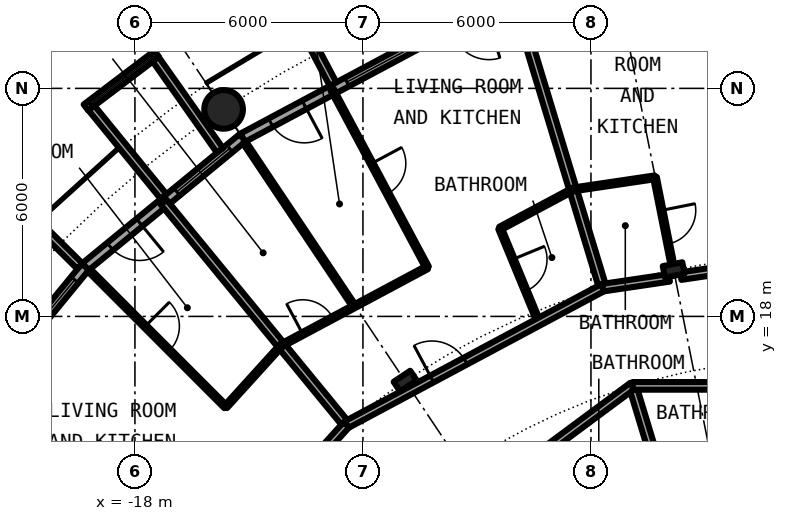
"""IFC4 building model, lengths in metres.
Left out: names, types, materials, properties, quantities, classifications, styles, units other than length and angle.
Written with IfcOpenShell. Run it as: python <this file> out.ifc"""

import sys

from ifc_helpers import new_model, si_unit, direction, frame, frame_2d, origin, origin_2d, place, context, subcontext, project, spatial, rectangle, circle, hollow_circle, i_section, extrude, element, fill, save


model = new_model("IFC4")
c1 = context("Model", 3, precision=1e-05, world=origin(), true_north=direction((0.0, 1.0)))
c2 = subcontext(c1, "Body", "Model", "MODEL_VIEW")
j1 = project(units=[si_unit("LENGTHUNIT", "METRE"), si_unit("PLANEANGLEUNIT", "RADIAN")], contexts=[c1])
p1 = place(None, origin())
s1 = spatial("IfcSite", under=j1, at=p1, CompositionType="ELEMENT")
p2 = place(p1, origin())
s2 = spatial("IfcBuilding", under=s1, at=p2, CompositionType="ELEMENT")
p3 = place(p2, frame((0.0, 0.0, 75.8)))
s3 = spatial("IfcBuildingStorey", under=s2, at=p3, CompositionType="ELEMENT", Elevation=75.8)
p4 = place(p3, frame((-15.667, 23.448, 0.0), z_axis=(0.0, 0.0, 1.0), x_axis=(1.0, 0.0, 0.0)))
e1 = element("IfcColumn", 1, at=p4, inside=s3, PredefinedType="COLUMN", context=c2, shape_type="SweptSolid", body=[
    extrude(hollow_circle(Radius=0.508, WallThickness=0.04, at=origin_2d()), origin(), (0.0, 0.0, 1.0), 3.05),
])
for number, where, z_axis, x_axis in (
    (2, (-3.824, 19.223, 0.0), (0.0, 0.0, 1.0), (-0.195, 0.981, 0.0)),
    (3, (-10.889, 16.297, 0.0), (0.0, 0.0, 1.0), (-0.556, 0.831, 0.0)),
):
    element("IfcColumn", number, at=place(p3, frame(where, z_axis=z_axis, x_axis=x_axis)), inside=s3, PredefinedType="COLUMN", context=c2, shape_type="SweptSolid", body=[
        extrude(i_section(OverallWidth=0.306, OverallDepth=0.524, WebThickness=0.021, FlangeThickness=0.04, FilletRadius=0.027, at=origin_2d()), origin(), (0.0, 0.0, 1.0), 3.05),
    ])
p5 = place(p3, frame((-10.447, 25.222, 0.0), z_axis=(0.0, 0.0, 1.0), x_axis=(-0.881915646801, -0.471407246368, 0.0)))
e4 = element("IfcWall", 4, at=p5, inside=s3, PredefinedType="SOLIDWALL", context=c2, shape_type="SweptSolid", body=[
    extrude(rectangle(XDim=5.352, YDim=0.25, at=frame_2d((2.676, 0.0))), origin(), (0.0, 0.0, 1.0), 2.7),
])
p6 = place(p5, frame((0.441, 0.0, 0.3)))
e5 = element("IfcOpeningElement", 5, at=p6, cuts=e4, PredefinedType="OPENING", context=c2, shape_type="SweptSolid", body=[
    extrude(rectangle(XDim=1.8, YDim=2.1, at=frame_2d((0.9, 1.05))), frame((0.0, 0.135, 0.0), z_axis=(0.0, -1.0, 0.0), x_axis=(1.0, 0.0, 0.0)), (0.0, 0.0, 1.0), 0.27),
])
p7 = place(p5, frame((3.51, 0.0, 0.0)))
e6 = element("IfcOpeningElement", 6, at=p7, cuts=e4, PredefinedType="OPENING", context=c2, shape_type="SweptSolid", body=[
    extrude(rectangle(XDim=1.0, YDim=2.2, at=frame_2d((0.5, 1.1))), frame((0.0, 0.135, 0.0), z_axis=(0.0, -1.0, 0.0), x_axis=(1.0, 0.0, 0.0)), (0.0, 0.0, 1.0), 0.27),
])
p8 = place(p3, frame((-12.787, 24.113, -0.03), z_axis=(0.0, 0.0, 1.0), x_axis=(-0.468365282436, 0.883534924159, 0.0)))
e7 = element("IfcWall", 7, at=p8, inside=s3, PredefinedType="SOLIDWALL", context=c2, shape_type="SweptSolid", body=[
    extrude(rectangle(XDim=3.006, YDim=0.2, at=frame_2d((1.503, 0.0))), origin(), (0.0, 0.0, 1.0), 2.73),
])
p9 = place(p3, frame((-15.167, 22.699, 0.0), z_axis=(0.0, 0.0, 1.0), x_axis=(-0.773019449054, -0.634382322723, 0.0)))
e8 = element("IfcWall", 8, at=p9, inside=s3, PredefinedType="SOLIDWALL", context=c2, shape_type="SweptSolid", body=[
    extrude(rectangle(XDim=5.352, YDim=0.25, at=frame_2d((2.676, 0.0))), origin(), (0.0, 0.0, 1.0), 2.7),
])
p10 = place(p9, frame((0.441, 0.0, 0.3)))
e9 = element("IfcOpeningElement", 9, at=p10, cuts=e8, PredefinedType="OPENING", context=c2, shape_type="SweptSolid", body=[
    extrude(rectangle(XDim=1.8, YDim=2.1, at=frame_2d((0.9, 1.05))), frame((0.0, 0.135, 0.0), z_axis=(0.0, -1.0, 0.0), x_axis=(1.0, 0.0, 0.0)), (0.0, 0.0, 1.0), 0.27),
])
p11 = place(p9, frame((3.51, 0.0, 0.0)))
e10 = element("IfcOpeningElement", 10, at=p11, cuts=e8, PredefinedType="OPENING", context=c2, shape_type="SweptSolid", body=[
    extrude(rectangle(XDim=1.0, YDim=2.2, at=frame_2d((0.5, 1.1))), frame((0.0, 0.135, 0.0), z_axis=(0.0, -1.0, 0.0), x_axis=(1.0, 0.0, 0.0)), (0.0, 0.0, 1.0), 0.27),
])
p12 = place(p3, frame((-17.427, 24.909, -0.03), z_axis=(0.0, 0.0, 1.0), x_axis=(-0.796842165306, -0.60418752353, 0.0)))
e11 = element("IfcWall", 11, at=p12, inside=s3, PredefinedType="SOLIDWALL", context=c2, shape_type="SweptSolid", body=[
    extrude(rectangle(XDim=2.337, YDim=0.2, at=frame_2d((1.168, 0.0))), origin(), (0.0, 0.0, 1.0), 2.73),
])
p13 = place(p12, frame((0.128, 0.0, 0.33)))
e12 = element("IfcOpeningElement", 12, at=p13, cuts=e11, PredefinedType="OPENING", context=c2, shape_type="SweptSolid", body=[
    extrude(circle(Radius=1.04, at=frame_2d((1.04, 1.04))), frame((0.0, 0.11, 0.0), z_axis=(0.0, -1.0, 0.0), x_axis=(1.0, 0.0, 0.0)), (0.0, 0.0, 1.0), 0.22),
])
p14 = place(p3, frame((-15.765, 22.37, -0.03), z_axis=(0.0, 0.0, 1.0), x_axis=(-0.576274612209, 0.817256123454, 0.0)))
e13 = element("IfcWall", 13, at=p14, inside=s3, PredefinedType="SOLIDWALL", context=c2, shape_type="SweptSolid", body=[
    extrude(rectangle(XDim=2.933, YDim=0.2, at=frame_2d((1.466, 0.0))), origin(), (0.0, 0.0, 1.0), 2.73),
])
p15 = place(p3, frame((-17.246, 21.155, -0.03), z_axis=(0.0, 0.0, 1.0), x_axis=(-0.631741648902, 0.775179004516, 0.0)))
e14 = element("IfcWall", 14, at=p15, inside=s3, PredefinedType="SOLIDWALL", context=c2, shape_type="SweptSolid", body=[
    extrude(rectangle(XDim=3.006, YDim=0.2, at=frame_2d((1.503, 0.0))), origin(), (0.0, 0.0, 1.0), 2.73),
])
p16 = place(p3, frame((-19.304, 19.304, 0.0), z_axis=(0.0, 0.0, 1.0), x_axis=(-0.634382322723, -0.773019449054, 0.0)))
e15 = element("IfcWall", 15, at=p16, inside=s3, PredefinedType="SOLIDWALL", context=c2, shape_type="SweptSolid", body=[
    extrude(rectangle(XDim=5.352, YDim=0.25, at=frame_2d((2.676, 0.0))), origin(), (0.0, 0.0, 1.0), 2.7),
])
p17 = place(p16, frame((0.441, 0.0, 0.3)))
e16 = element("IfcOpeningElement", 16, at=p17, cuts=e15, PredefinedType="OPENING", context=c2, shape_type="SweptSolid", body=[
    extrude(rectangle(XDim=1.8, YDim=2.1, at=frame_2d((0.9, 1.05))), frame((0.0, 0.135, 0.0), z_axis=(0.0, -1.0, 0.0), x_axis=(1.0, 0.0, 0.0)), (0.0, 0.0, 1.0), 0.27),
])
p18 = place(p16, frame((3.51, 0.0, 0.0)))
e17 = element("IfcOpeningElement", 17, at=p18, cuts=e15, PredefinedType="OPENING", context=c2, shape_type="SweptSolid", body=[
    extrude(rectangle(XDim=1.0, YDim=2.2, at=frame_2d((0.5, 1.1))), frame((0.0, 0.135, 0.0), z_axis=(0.0, -1.0, 0.0), x_axis=(1.0, 0.0, 0.0)), (0.0, 0.0, 1.0), 0.27),
])
p19 = place(p3, frame((-19.45, 19.323, -0.03), z_axis=(0.0, 0.0, 1.0), x_axis=(-0.709727076896, 0.704476739375, 0.0)))
e18 = element("IfcWall", 18, at=p19, inside=s3, PredefinedType="SOLIDWALL", context=c2, shape_type="SweptSolid", body=[
    extrude(rectangle(XDim=2.883, YDim=0.2, at=frame_2d((1.441, 0.0))), origin(), (0.0, 0.0, 1.0), 2.73),
])
p20 = place(p3, frame((-22.595, 15.098, 0.0), z_axis=(0.0, 0.0, 1.0), x_axis=(0.831382022135, -0.555701298605, 0.0)))
e19 = element("IfcWall", 19, at=p20, inside=s3, PredefinedType="PARTITIONING", context=c2, shape_type="SweptSolid", body=[
    extrude(rectangle(XDim=7.313, YDim=0.2, at=frame_2d((3.657, 0.0))), origin(), (0.0, 0.0, 1.0), 2.7),
])
p21 = place(p3, frame((-7.887, 26.005, 0.0), z_axis=(0.0, 0.0, 1.0), x_axis=(0.29005838641, -0.957008951094, 0.0)))
e20 = element("IfcWall", 20, at=p21, inside=s3, PredefinedType="PARTITIONING", context=c2, shape_type="SweptSolid", body=[
    extrude(rectangle(XDim=7.574, YDim=0.2, at=frame_2d((3.787, 0.0))), origin(), (0.0, 0.0, 1.0), 2.7),
])
p22 = place(p3, frame((-4.907, 16.172, 0.0), z_axis=(0.0, 0.0, 1.0), x_axis=(0.289977130626, -0.957033575019, 0.0)))
e21 = element("IfcWall", 21, at=p22, inside=s3, PredefinedType="PARTITIONING", context=c2, shape_type="SweptSolid", body=[
    extrude(rectangle(XDim=9.18, YDim=0.2, at=frame_2d((4.59, 0.0))), origin(), (0.0, 0.0, 1.0), 2.7),
])
p23 = place(p3, frame((-19.211, 19.221, 0.0), z_axis=(0.0, 0.0, 1.0), x_axis=(0.706914880313, -0.707298629994, 0.0)))
e22 = element("IfcWall", 22, at=p23, inside=s3, PredefinedType="PARTITIONING", context=c2, shape_type="SweptSolid", body=[
    extrude(rectangle(XDim=5.09, YDim=0.1, at=frame_2d((2.545, 0.0))), origin(), (0.0, 0.0, 1.0), 2.7),
])
p24 = place(p23, frame((2.095, 0.0, 0.0)))
e23 = element("IfcOpeningElement", 23, at=p24, cuts=e22, PredefinedType="OPENING", context=c2, shape_type="SweptSolid", body=[
    extrude(rectangle(XDim=0.9, YDim=2.3, at=frame_2d((0.45, 1.15))), frame((0.0, 0.06, 0.0), z_axis=(0.0, -1.0, 0.0), x_axis=(1.0, 0.0, 0.0)), (0.0, 0.0, 1.0), 0.12),
])
p25 = place(p3, frame((-17.243, 21.005, 0.0), z_axis=(0.0, 0.0, 1.0), x_axis=(0.63447412651, -0.772944100689, 0.0)))
e24 = element("IfcWall", 24, at=p25, inside=s3, PredefinedType="PARTITIONING", context=c2, shape_type="SweptSolid", body=[
    extrude(rectangle(XDim=7.576, YDim=0.2, at=frame_2d((3.788, 0.0))), origin(), (0.0, 0.0, 1.0), 2.7),
])
p26 = place(p3, frame((-15.119, 22.581, 0.0), z_axis=(0.0, 0.0, 1.0), x_axis=(0.556271707676, -0.83100047367, 0.0)))
e25 = element("IfcWall", 25, at=p26, inside=s3, PredefinedType="PARTITIONING", context=c2, shape_type="SweptSolid", body=[
    extrude(rectangle(XDim=5.195, YDim=0.1, at=frame_2d((2.598, 0.0))), origin(), (0.0, 0.0, 1.0), 2.7),
])
p27 = place(p3, frame((-12.81, 23.966, 0.0), z_axis=(0.0, 0.0, 1.0), x_axis=(0.47140999111, -0.881914179658, 0.0)))
e26 = element("IfcWall", 26, at=p27, inside=s3, PredefinedType="PARTITIONING", context=c2, shape_type="SweptSolid", body=[
    extrude(rectangle(XDim=5.303, YDim=0.1, at=frame_2d((2.652, 0.0))), origin(), (0.0, 0.0, 1.0), 2.7),
])
p28 = place(p27, frame((2.202, 0.0, 0.0)))
e27 = element("IfcOpeningElement", 27, at=p28, cuts=e26, PredefinedType="OPENING", context=c2, shape_type="SweptSolid", body=[
    extrude(rectangle(XDim=0.9, YDim=2.3, at=frame_2d((0.45, 1.15))), frame((0.0, 0.06, 0.0), z_axis=(0.0, -1.0, 0.0), x_axis=(1.0, 0.0, 0.0)), (0.0, 0.0, 1.0), 0.12),
])
p29 = place(p3, frame((-8.392, 20.314, 0.0), z_axis=(0.0, 0.0, 1.0), x_axis=(0.38190329031, -0.924202292169, 0.0)))
e28 = element("IfcWall", 28, at=p29, inside=s3, PredefinedType="PARTITIONING", context=c2, shape_type="SweptSolid", body=[
    extrude(rectangle(XDim=2.661, YDim=0.1, at=frame_2d((1.33, 0.0))), origin(), (0.0, 0.0, 1.0), 2.7),
])
p30 = place(p29, frame((0.88, 0.0, 0.0)))
e29 = element("IfcOpeningElement", 29, at=p30, cuts=e28, PredefinedType="OPENING", context=c2, shape_type="SweptSolid", body=[
    extrude(rectangle(XDim=0.9, YDim=2.3, at=frame_2d((0.45, 1.15))), frame((0.0, 0.06, 0.0), z_axis=(0.0, -1.0, 0.0), x_axis=(1.0, 0.0, 0.0)), (0.0, 0.0, 1.0), 0.12),
])
p31 = place(p3, frame((-4.316, 21.66, 0.0), z_axis=(0.0, 0.0, 1.0), x_axis=(0.195524955938, -0.980698726218, 0.0)))
e30 = element("IfcWall", 30, at=p31, inside=s3, PredefinedType="PARTITIONING", context=c2, shape_type="SweptSolid", body=[
    extrude(rectangle(XDim=2.224, YDim=0.1, at=frame_2d((1.112, 0.0))), origin(), (0.0, 0.0, 1.0), 2.7),
])
p32 = place(p31, frame((0.887, 0.0, 0.0)))
e31 = element("IfcOpeningElement", 31, at=p32, cuts=e30, PredefinedType="OPENING", context=c2, shape_type="SweptSolid", body=[
    extrude(rectangle(XDim=0.9, YDim=2.3, at=frame_2d((0.45, 1.15))), frame((0.0, 0.06, 0.0), z_axis=(0.0, -1.0, 0.0), x_axis=(1.0, 0.0, 0.0)), (0.0, 0.0, 1.0), 0.12),
])
p33 = place(p3, frame((-12.745, 10.358, 0.0), z_axis=(0.0, 0.0, 1.0), x_axis=(0.803191461888, 0.595720971219, 0.0)))
e32 = element("IfcWall", 32, at=p33, inside=s3, PredefinedType="PARTITIONING", context=c2, shape_type="SweptSolid", body=[
    extrude(rectangle(XDim=9.76, YDim=0.2, at=frame_2d((4.88, 0.0))), origin(), (0.0, 0.0, 1.0), 2.7),
])
p34 = place(p33, frame((4.38, 0.0, 0.0)))
e33 = element("IfcOpeningElement", 33, at=p34, cuts=e32, PredefinedType="OPENING", context=c2, shape_type="SweptSolid", body=[
    extrude(rectangle(XDim=1.0, YDim=2.3, at=frame_2d((0.5, 1.15))), frame((0.0, 0.11, 0.0), z_axis=(0.0, -1.0, 0.0), x_axis=(1.0, 0.0, 0.0)), (0.0, 0.0, 1.0), 0.22),
])
p35 = place(p3, frame((-4.906, 16.172, 0.0), z_axis=(0.0, 0.0, 1.0), x_axis=(1.0, 0.0, 0.0)))
e34 = element("IfcWall", 34, at=p35, inside=s3, PredefinedType="PARTITIONING", context=c2, shape_type="SweptSolid", body=[
    extrude(rectangle(XDim=9.812, YDim=0.2, at=frame_2d((4.906, 0.0))), origin(), (0.0, 0.0, 1.0), 2.7),
])
p36 = place(p35, frame((4.406, 0.0, 0.0)))
e35 = element("IfcOpeningElement", 35, at=p36, cuts=e34, PredefinedType="OPENING", context=c2, shape_type="SweptSolid", body=[
    extrude(rectangle(XDim=1.0, YDim=2.3, at=frame_2d((0.5, 1.15))), frame((0.0, 0.11, 0.0), z_axis=(0.0, -1.0, 0.0), x_axis=(1.0, 0.0, 0.0)), (0.0, 0.0, 1.0), 0.22),
])
p37 = place(p3, frame((-12.434, 15.151, 0.0), z_axis=(0.0, 0.0, 1.0), x_axis=(0.881899173092, 0.47143806433, 0.0)))
e36 = element("IfcWall", 36, at=p37, inside=s3, PredefinedType="PARTITIONING", context=c2, shape_type="SweptSolid", body=[
    extrude(rectangle(XDim=7.647, YDim=0.2, at=frame_2d((3.824, 0.0))), origin(), (0.0, 0.0, 1.0), 2.38),
])
p38 = place(p37, frame((2.55, 0.0, 0.0)))
e37 = element("IfcOpeningElement", 37, at=p38, cuts=e36, PredefinedType="OPENING", context=c2, shape_type="SweptSolid", body=[
    extrude(rectangle(XDim=1.0, YDim=2.3, at=frame_2d((0.5, 1.15))), frame((0.0, 0.11, 0.0), z_axis=(0.0, -1.0, 0.0), x_axis=(1.0, 0.0, 0.0)), (0.0, 0.0, 1.0), 0.22),
])
p39 = place(p3, frame((-16.193, 11.004, 0.0), z_axis=(0.0, 0.0, 1.0), x_axis=(0.671601747072, 0.740912338492, 0.0)))
e38 = element("IfcWall", 38, at=p39, inside=s3, PredefinedType="PARTITIONING", context=c2, shape_type="SweptSolid", body=[
    extrude(rectangle(XDim=5.597, YDim=0.2, at=frame_2d((2.799, 0.0))), origin(), (0.0, 0.0, 1.0), 2.38),
])
p40 = place(p39, frame((3.18, 0.0, 0.0)))
e39 = element("IfcOpeningElement", 39, at=p40, cuts=e38, PredefinedType="OPENING", context=c2, shape_type="SweptSolid", body=[
    extrude(rectangle(XDim=1.0, YDim=2.3, at=frame_2d((0.5, 1.15))), frame((0.0, 0.11, 0.0), z_axis=(0.0, -1.0, 0.0), x_axis=(1.0, 0.0, 0.0)), (0.0, 0.0, 1.0), 0.22),
])
p41 = place(p3, frame((-5.69, 18.756, 0.0), z_axis=(0.0, 0.0, 1.0), x_axis=(0.989265547993, 0.146128968906, 0.0)))
e40 = element("IfcWall", 40, at=p41, inside=s3, PredefinedType="PARTITIONING", context=c2, shape_type="SweptSolid", body=[
    extrude(rectangle(XDim=1.771, YDim=0.2, at=frame_2d((0.885, 0.0))), origin(), (0.0, 0.0, 1.0), 2.38),
])
p42 = place(p3, frame((-3.635, 19.06, 0.0), z_axis=(0.0, 0.0, 1.0), x_axis=(0.989179233347, 0.14671211373, 0.0)))
e41 = element("IfcWall", 41, at=p42, inside=s3, PredefinedType="PARTITIONING", context=c2, shape_type="SweptSolid", body=[
    extrude(rectangle(XDim=3.681, YDim=0.2, at=frame_2d((1.84, 0.0))), origin(), (0.0, 0.0, 1.0), 2.38),
])
p43 = place(p42, frame((1.258, 0.0, 0.0)))
e42 = element("IfcOpeningElement", 42, at=p43, cuts=e41, PredefinedType="OPENING", context=c2, shape_type="SweptSolid", body=[
    extrude(rectangle(XDim=1.0, YDim=2.3, at=frame_2d((0.5, 1.15))), frame((0.0, 0.11, 0.0), z_axis=(0.0, -1.0, 0.0), x_axis=(1.0, 0.0, 0.0)), (0.0, 0.0, 1.0), 0.22),
])
p44 = place(p3, frame((-14.148, 17.236, 0.0), z_axis=(0.0, 0.0, 1.0), x_axis=(0.881763472003, 0.471691826769, 0.0)))
e43 = element("IfcWall", 43, at=p44, inside=s3, PredefinedType="PARTITIONING", context=c2, shape_type="SweptSolid", body=[
    extrude(rectangle(XDim=4.35, YDim=0.1, at=frame_2d((2.175, 0.0))), origin(), (0.0, 0.0, 1.0), 2.7),
])
p45 = place(p44, frame((0.639, 0.0, 0.0)))
e44 = element("IfcOpeningElement", 44, at=p45, cuts=e43, PredefinedType="OPENING", context=c2, shape_type="SweptSolid", body=[
    extrude(rectangle(XDim=0.9, YDim=2.3, at=frame_2d((0.45, 1.15))), frame((0.0, 0.06, 0.0), z_axis=(0.0, -1.0, 0.0), x_axis=(1.0, 0.0, 0.0)), (0.0, 0.0, 1.0), 0.12),
])
p46 = place(p3, frame((-8.392, 20.314, 0.0), z_axis=(0.0, 0.0, 1.0), x_axis=(0.881864921102, 0.471502132476, 0.0)))
e45 = element("IfcWall", 45, at=p46, inside=s3, PredefinedType="PARTITIONING", context=c2, shape_type="SweptSolid", body=[
    extrude(rectangle(XDim=2.176, YDim=0.1, at=frame_2d((1.088, 0.0))), origin(), (0.0, 0.0, 1.0), 2.7),
])
p47 = place(p3, frame((-15.612, 15.622, 0.0), z_axis=(0.0, 0.0, 1.0), x_axis=(0.671674967707, 0.740845960882, 0.0)))
e46 = element("IfcWall", 46, at=p47, inside=s3, PredefinedType="PARTITIONING", context=c2, shape_type="SweptSolid", body=[
    extrude(rectangle(XDim=2.181, YDim=0.1, at=frame_2d((1.091, 0.0))), origin(), (0.0, 0.0, 1.0), 2.7),
])
p48 = place(p3, frame((-6.472, 21.34, 0.0), z_axis=(0.0, 0.0, 1.0), x_axis=(0.989185420695, 0.146670390618, 0.0)))
e47 = element("IfcWall", 47, at=p48, inside=s3, PredefinedType="PARTITIONING", context=c2, shape_type="SweptSolid", body=[
    extrude(rectangle(XDim=2.181, YDim=0.1, at=frame_2d((1.09, 0.0))), origin(), (0.0, 0.0, 1.0), 2.7),
])
p49 = place(p6, origin())
e48 = element("IfcWindow", 48, at=p49, inside=s3, PartitioningType="SINGLE_PANEL", PredefinedType="WINDOW", context=c2, shape_type="SweptSolid", body=[
    extrude(rectangle(XDim=1.8, YDim=2.1, at=frame_2d((0.9, 1.05))), frame((0.0, 0.03, 0.0), z_axis=(0.0, -1.0, 0.0), x_axis=(1.0, 0.0, 0.0)), (0.0, 0.0, 1.0), 0.06),
])
fill(e5, e48)
p50 = place(p7, origin())
e49 = element("IfcDoor", 49, at=p50, inside=s3, OperationType="SINGLE_SWING_LEFT", PredefinedType="DOOR", context=c2, shape_type="SweptSolid", body=[
    extrude(rectangle(XDim=1.0, YDim=2.2, at=frame_2d((0.5, 1.1))), frame((0.0, 0.025, 0.0), z_axis=(0.0, -1.0, 0.0), x_axis=(1.0, 0.0, 0.0)), (0.0, 0.0, 1.0), 0.05),
])
fill(e6, e49)
p51 = place(p10, origin())
e50 = element("IfcWindow", 50, at=p51, inside=s3, PartitioningType="SINGLE_PANEL", PredefinedType="WINDOW", context=c2, shape_type="SweptSolid", body=[
    extrude(rectangle(XDim=1.8, YDim=2.1, at=frame_2d((0.9, 1.05))), frame((0.0, 0.03, 0.0), z_axis=(0.0, -1.0, 0.0), x_axis=(1.0, 0.0, 0.0)), (0.0, 0.0, 1.0), 0.06),
])
fill(e9, e50)
p52 = place(p13, origin())
e51 = element("IfcWindow", 51, at=p52, inside=s3, PartitioningType="SINGLE_PANEL", PredefinedType="WINDOW", context=c2, shape_type="SweptSolid", body=[
    extrude(circle(Radius=1.04, at=frame_2d((1.04, 1.04))), frame((0.0, 0.03, 0.0), z_axis=(0.0, -1.0, 0.0), x_axis=(1.0, 0.0, 0.0)), (0.0, 0.0, 1.0), 0.06),
])
fill(e12, e51)
p53 = place(p11, origin())
e52 = element("IfcDoor", 52, at=p53, inside=s3, OperationType="SINGLE_SWING_LEFT", PredefinedType="DOOR", context=c2, shape_type="SweptSolid", body=[
    extrude(rectangle(XDim=1.0, YDim=2.2, at=frame_2d((0.5, 1.1))), frame((0.0, 0.025, 0.0), z_axis=(0.0, -1.0, 0.0), x_axis=(1.0, 0.0, 0.0)), (0.0, 0.0, 1.0), 0.05),
])
fill(e10, e52)
p54 = place(p17, origin())
e53 = element("IfcWindow", 53, at=p54, inside=s3, PartitioningType="SINGLE_PANEL", PredefinedType="WINDOW", context=c2, shape_type="SweptSolid", body=[
    extrude(rectangle(XDim=1.8, YDim=2.1, at=frame_2d((0.9, 1.05))), frame((0.0, 0.03, 0.0), z_axis=(0.0, -1.0, 0.0), x_axis=(1.0, 0.0, 0.0)), (0.0, 0.0, 1.0), 0.06),
])
fill(e16, e53)
p55 = place(p32, origin())
e54 = element("IfcDoor", 54, at=p55, inside=s3, OperationType="SINGLE_SWING_RIGHT", PredefinedType="DOOR", context=c2, shape_type="SweptSolid", body=[
    extrude(rectangle(XDim=0.9, YDim=2.3, at=frame_2d((0.45, 1.15))), frame((0.0, 0.025, 0.0), z_axis=(0.0, -1.0, 0.0), x_axis=(1.0, 0.0, 0.0)), (0.0, 0.0, 1.0), 0.05),
])
fill(e31, e54)
p56 = place(p38, origin())
e55 = element("IfcDoor", 55, at=p56, inside=s3, OperationType="SINGLE_SWING_LEFT", PredefinedType="DOOR", context=c2, shape_type="SweptSolid", body=[
    extrude(rectangle(XDim=1.0, YDim=2.3, at=frame_2d((0.5, 1.15))), frame((0.0, 0.025, 0.0), z_axis=(0.0, -1.0, 0.0), x_axis=(1.0, 0.0, 0.0)), (0.0, 0.0, 1.0), 0.05),
])
fill(e37, e55)
p57 = place(p30, origin())
e56 = element("IfcDoor", 56, at=p57, inside=s3, OperationType="SINGLE_SWING_RIGHT", PredefinedType="DOOR", context=c2, shape_type="SweptSolid", body=[
    extrude(rectangle(XDim=0.9, YDim=2.3, at=frame_2d((0.45, 1.15))), frame((0.0, 0.025, 0.0), z_axis=(0.0, -1.0, 0.0), x_axis=(1.0, 0.0, 0.0)), (0.0, 0.0, 1.0), 0.05),
])
fill(e29, e56)
p58 = place(p28, origin())
e57 = element("IfcDoor", 57, at=p58, inside=s3, OperationType="SINGLE_SWING_RIGHT", PredefinedType="DOOR", context=c2, shape_type="SweptSolid", body=[
    extrude(rectangle(XDim=0.9, YDim=2.3, at=frame_2d((0.45, 1.15))), frame((0.0, 0.025, 0.0), z_axis=(0.0, -1.0, 0.0), x_axis=(1.0, 0.0, 0.0)), (0.0, 0.0, 1.0), 0.05),
])
fill(e27, e57)
p59 = place(p45, origin())
e58 = element("IfcDoor", 58, at=p59, inside=s3, OperationType="SINGLE_SWING_LEFT", PredefinedType="DOOR", context=c2, shape_type="SweptSolid", body=[
    extrude(rectangle(XDim=0.9, YDim=2.3, at=frame_2d((0.45, 1.15))), frame((0.0, 0.025, 0.0), z_axis=(0.0, -1.0, 0.0), x_axis=(1.0, 0.0, 0.0)), (0.0, 0.0, 1.0), 0.05),
])
fill(e44, e58)
p60 = place(p24, origin())
e59 = element("IfcDoor", 59, at=p60, inside=s3, OperationType="SINGLE_SWING_LEFT", PredefinedType="DOOR", context=c2, shape_type="SweptSolid", body=[
    extrude(rectangle(XDim=0.9, YDim=2.3, at=frame_2d((0.45, 1.15))), frame((0.0, 0.025, 0.0), z_axis=(0.0, -1.0, 0.0), x_axis=(1.0, 0.0, 0.0)), (0.0, 0.0, 1.0), 0.05),
])
fill(e23, e59)
save(model, sys.argv[1])
